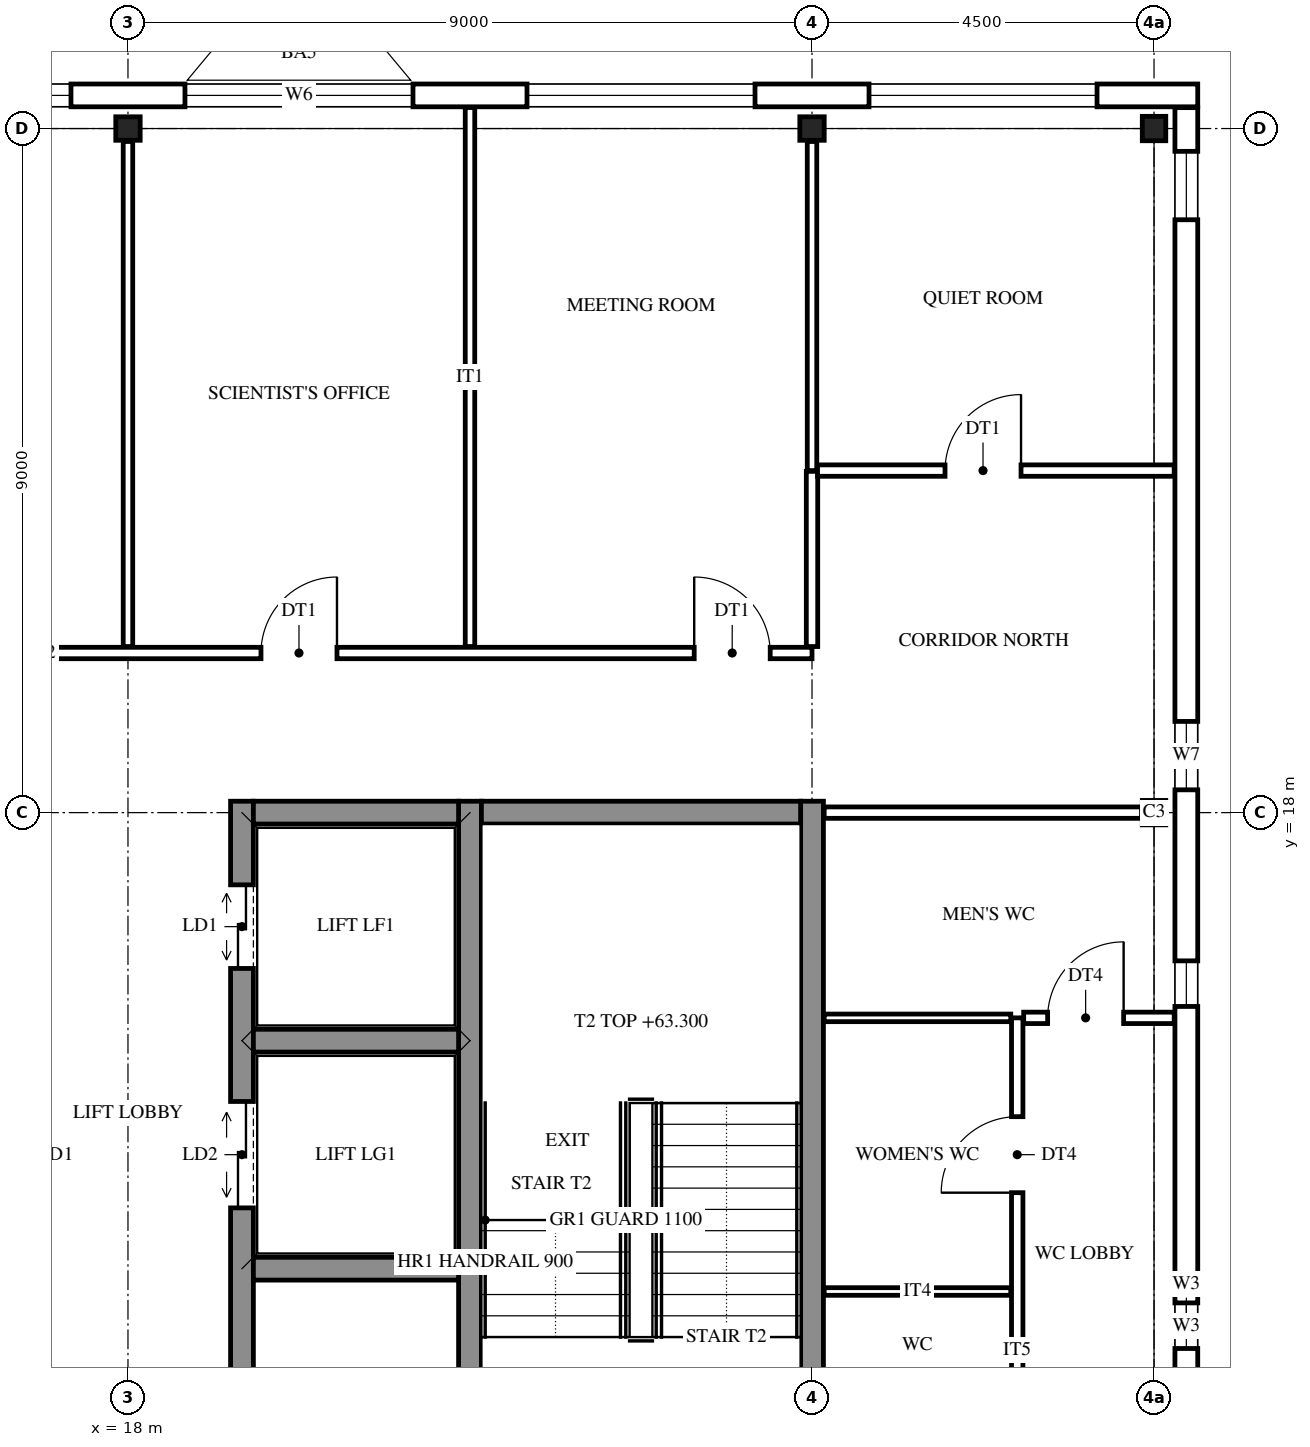
"""IFC4 building model, lengths in metres.
Left out: names, types, materials, properties, quantities, classifications, styles, units other than length and angle.
Written with IfcOpenShell. Run it as: python <this file> out.ifc"""

import sys

from ifc_helpers import new_model, si_unit, direction, frame, frame_2d, origin, origin_2d, place, context, subcontext, project, spatial, rectangle, i_section, extrude, element, fill, save


model = new_model("IFC4")
c1 = context("Model", 3, precision=1e-05, world=origin(), true_north=direction((0.0, 1.0)))
c2 = subcontext(c1, "Body", "Model", "MODEL_VIEW")
j1 = project(units=[si_unit("LENGTHUNIT", "METRE"), si_unit("PLANEANGLEUNIT", "RADIAN")], contexts=[c1])
p1 = place(None, origin())
s1 = spatial("IfcSite", under=j1, at=p1, CompositionType="ELEMENT")
p2 = place(p1, origin())
s2 = spatial("IfcBuilding", under=s1, at=p2, CompositionType="ELEMENT")
p3 = place(p2, frame((0.0, 0.0, 61.2)))
s3 = spatial("IfcBuildingStorey", under=s2, at=p3, CompositionType="ELEMENT", Elevation=61.2)
for number, where, z_axis, x_axis in (
    (1, (18.0, 27.0, 0.0), (0.0, 0.0, 1.0), (0.0, 1.0, 0.0)),
    (2, (27.0, 27.0, 0.0), (0.0, 0.0, 1.0), (0.0, 1.0, 0.0)),
    (3, (31.5, 18.0, 0.0), (0.0, 0.0, 1.0), (1.0, 0.0, 0.0)),
    (4, (31.5, 27.0, 0.0), (0.0, 0.0, 1.0), (1.0, 0.0, 0.0)),
):
    element("IfcColumn", number, at=place(p3, frame(where, z_axis=z_axis, x_axis=x_axis)), inside=s3, PredefinedType="COLUMN", context=c2, shape_type="SweptSolid", body=[
        extrude(i_section(OverallWidth=0.309, OverallDepth=0.321, WebThickness=0.014, FlangeThickness=0.022, FilletRadius=0.017, at=origin_2d()), origin(), (0.0, 0.0, 1.0), 4.2),
    ])
p4 = place(p3, frame((19.5, 8.85, 0.0), z_axis=(0.0, 0.0, 1.0), x_axis=(0.0, 1.0, 0.0)))
e5 = element("IfcWall", 5, at=p4, inside=s3, PredefinedType="SHEAR", context=c2, shape_type="SweptSolid", body=[
    extrude(rectangle(XDim=9.3, YDim=0.3, at=frame_2d((4.65, 0.0))), origin(), (0.0, 0.0, 1.0), 4.2),
])
p5 = place(p4, frame((3.95, 0.0, 0.0)))
e6 = element("IfcOpeningElement", 6, at=p5, cuts=e5, PredefinedType="OPENING", context=c2, shape_type="SweptSolid", body=[
    extrude(rectangle(XDim=1.4, YDim=2.1, at=frame_2d((0.7, 1.05))), frame((0.0, 0.16, 0.0), z_axis=(0.0, -1.0, 0.0), x_axis=(1.0, 0.0, 0.0)), (0.0, 0.0, 1.0), 0.32),
])
p6 = place(p4, frame((7.1, 0.0, 0.0)))
e7 = element("IfcOpeningElement", 7, at=p6, cuts=e5, PredefinedType="OPENING", context=c2, shape_type="SweptSolid", body=[
    extrude(rectangle(XDim=1.1, YDim=2.1, at=frame_2d((0.55, 1.05))), frame((0.0, 0.16, 0.0), z_axis=(0.0, -1.0, 0.0), x_axis=(1.0, 0.0, 0.0)), (0.0, 0.0, 1.0), 0.32),
])
for number, where, z_axis, x_axis in (
    (8, (22.5, 8.85, 0.0), (0.0, 0.0, 1.0), (0.0, 1.0, 0.0)),
    (9, (27.0, 8.85, 0.0), (0.0, 0.0, 1.0), (0.0, 1.0, 0.0)),
):
    element("IfcWall", number, at=place(p3, frame(where, z_axis=z_axis, x_axis=x_axis)), inside=s3, PredefinedType="SHEAR", context=c2, shape_type="SweptSolid", body=[
        extrude(rectangle(XDim=9.3, YDim=0.3, at=frame_2d((4.65, 0.0))), origin(), (0.0, 0.0, 1.0), 4.2),
    ])
for number, where, z_axis, x_axis in (
    (10, (19.65, 12.0, 0.0), (0.0, 0.0, 1.0), (1.0, 0.0, 0.0)),
    (11, (19.65, 15.0, 0.0), (0.0, 0.0, 1.0), (1.0, 0.0, 0.0)),
    (12, (19.65, 18.0, 0.0), (0.0, 0.0, 1.0), (1.0, 0.0, 0.0)),
):
    element("IfcWall", number, at=place(p3, frame(where, z_axis=z_axis, x_axis=x_axis)), inside=s3, PredefinedType="SHEAR", context=c2, shape_type="SweptSolid", body=[
        extrude(rectangle(XDim=2.7, YDim=0.3, at=frame_2d((1.35, 0.0))), origin(), (0.0, 0.0, 1.0), 4.2),
    ])
p7 = place(p3, frame((22.65, 18.0, 0.0), z_axis=(0.0, 0.0, 1.0), x_axis=(1.0, 0.0, 0.0)))
e13 = element("IfcWall", 13, at=p7, inside=s3, PredefinedType="SHEAR", context=c2, shape_type="SweptSolid", body=[
    extrude(rectangle(XDim=4.2, YDim=0.3, at=frame_2d((2.1, 0.0))), origin(), (0.0, 0.0, 1.0), 4.2),
])
p8 = place(p3, frame((8.414, 27.436, 0.0), z_axis=(0.0, 0.0, 1.0), x_axis=(1.0, 0.0, 0.0)))
e14 = element("IfcWall", 14, at=p8, inside=s3, PredefinedType="STANDARD", context=c2, shape_type="SweptSolid", body=[
    extrude(rectangle(XDim=23.661, YDim=0.3, at=frame_2d((11.831, 0.0))), origin(), (0.0, 0.0, 1.0), 4.2),
])
p9 = place(p8, frame((1.336, 0.0, 0.6)))
e15 = element("IfcOpeningElement", 15, at=p9, cuts=e14, PredefinedType="OPENING", context=c2, shape_type="SweptSolid", body=[
    extrude(rectangle(XDim=3.0, YDim=2.8, at=frame_2d((1.5, 1.4))), frame((0.0, 0.16, 0.0), z_axis=(0.0, -1.0, 0.0), x_axis=(1.0, 0.0, 0.0)), (0.0, 0.0, 1.0), 0.32),
])
p10 = place(p8, frame((5.836, 0.0, 0.6)))
e16 = element("IfcOpeningElement", 16, at=p10, cuts=e14, PredefinedType="OPENING", context=c2, shape_type="SweptSolid", body=[
    extrude(rectangle(XDim=3.0, YDim=2.8, at=frame_2d((1.5, 1.4))), frame((0.0, 0.16, 0.0), z_axis=(0.0, -1.0, 0.0), x_axis=(1.0, 0.0, 0.0)), (0.0, 0.0, 1.0), 0.32),
])
p11 = place(p8, frame((10.336, 0.0, 0.6)))
e17 = element("IfcOpeningElement", 17, at=p11, cuts=e14, PredefinedType="OPENING", context=c2, shape_type="SweptSolid", body=[
    extrude(rectangle(XDim=3.0, YDim=2.8, at=frame_2d((1.5, 1.4))), frame((0.0, 0.16, 0.0), z_axis=(0.0, -1.0, 0.0), x_axis=(1.0, 0.0, 0.0)), (0.0, 0.0, 1.0), 0.32),
])
p12 = place(p8, frame((14.836, 0.0, 0.6)))
e18 = element("IfcOpeningElement", 18, at=p12, cuts=e14, PredefinedType="OPENING", context=c2, shape_type="SweptSolid", body=[
    extrude(rectangle(XDim=3.0, YDim=2.8, at=frame_2d((1.5, 1.4))), frame((0.0, 0.16, 0.0), z_axis=(0.0, -1.0, 0.0), x_axis=(1.0, 0.0, 0.0)), (0.0, 0.0, 1.0), 0.32),
])
p13 = place(p8, frame((19.336, 0.0, 0.6)))
e19 = element("IfcOpeningElement", 19, at=p13, cuts=e14, PredefinedType="OPENING", context=c2, shape_type="SweptSolid", body=[
    extrude(rectangle(XDim=3.0, YDim=2.8, at=frame_2d((1.5, 1.4))), frame((0.0, 0.16, 0.0), z_axis=(0.0, -1.0, 0.0), x_axis=(1.0, 0.0, 0.0)), (0.0, 0.0, 1.0), 0.32),
])
p14 = place(p3, frame((31.925, 27.275, 0.0), z_axis=(0.0, 0.0, 1.0), x_axis=(0.0, -1.0, 0.0)))
e20 = element("IfcWall", 20, at=p14, inside=s3, PredefinedType="STANDARD", context=c2, shape_type="SweptSolid", body=[
    extrude(rectangle(XDim=27.55, YDim=0.3, at=frame_2d((13.775, 0.0))), origin(), (0.0, 0.0, 1.0), 4.2),
])
p15 = place(p14, frame((26.075, 0.0, 0.6)))
e21 = element("IfcOpeningElement", 21, at=p15, cuts=e20, PredefinedType="OPENING", context=c2, shape_type="SweptSolid", body=[
    extrude(rectangle(XDim=0.9, YDim=2.3, at=frame_2d((0.45, 1.15))), frame((0.0, 0.16, 0.0), z_axis=(0.0, -1.0, 0.0), x_axis=(1.0, 0.0, 0.0)), (0.0, 0.0, 1.0), 0.32),
])
p16 = place(p14, frame((18.575, 0.0, 0.6)))
e22 = element("IfcOpeningElement", 22, at=p16, cuts=e20, PredefinedType="OPENING", context=c2, shape_type="SweptSolid", body=[
    extrude(rectangle(XDim=0.9, YDim=2.3, at=frame_2d((0.45, 1.15))), frame((0.0, 0.16, 0.0), z_axis=(0.0, -1.0, 0.0), x_axis=(1.0, 0.0, 0.0)), (0.0, 0.0, 1.0), 0.32),
])
p17 = place(p14, frame((15.725, 0.0, 1.6)))
e23 = element("IfcOpeningElement", 23, at=p17, cuts=e20, PredefinedType="OPENING", context=c2, shape_type="SweptSolid", body=[
    extrude(rectangle(XDim=0.6, YDim=0.9, at=frame_2d((0.3, 0.45))), frame((0.0, 0.16, 0.0), z_axis=(0.0, -1.0, 0.0), x_axis=(1.0, 0.0, 0.0)), (0.0, 0.0, 1.0), 0.32),
])
p18 = place(p14, frame((11.225, 0.0, 1.6)))
e24 = element("IfcOpeningElement", 24, at=p18, cuts=e20, PredefinedType="OPENING", context=c2, shape_type="SweptSolid", body=[
    extrude(rectangle(XDim=0.6, YDim=0.9, at=frame_2d((0.3, 0.45))), frame((0.0, 0.16, 0.0), z_axis=(0.0, -1.0, 0.0), x_axis=(1.0, 0.0, 0.0)), (0.0, 0.0, 1.0), 0.32),
])
p19 = place(p14, frame((8.075, 0.0, 0.6)))
e25 = element("IfcOpeningElement", 25, at=p19, cuts=e20, PredefinedType="OPENING", context=c2, shape_type="SweptSolid", body=[
    extrude(rectangle(XDim=0.9, YDim=2.3, at=frame_2d((0.45, 1.15))), frame((0.0, 0.16, 0.0), z_axis=(0.0, -1.0, 0.0), x_axis=(1.0, 0.0, 0.0)), (0.0, 0.0, 1.0), 0.32),
])
p20 = place(p14, frame((0.575, 0.0, 0.6)))
e26 = element("IfcOpeningElement", 26, at=p20, cuts=e20, PredefinedType="OPENING", context=c2, shape_type="SweptSolid", body=[
    extrude(rectangle(XDim=0.9, YDim=2.3, at=frame_2d((0.45, 1.15))), frame((0.0, 0.16, 0.0), z_axis=(0.0, -1.0, 0.0), x_axis=(1.0, 0.0, 0.0)), (0.0, 0.0, 1.0), 0.32),
])
p21 = place(p3, frame((18.0, 20.185, 0.0), z_axis=(0.0, 0.0, 1.0), x_axis=(0.0, 1.0, 0.0)))
e27 = element("IfcWall", 27, at=p21, inside=s3, PredefinedType="PARTITIONING", context=c2, shape_type="SweptSolid", body=[
    extrude(rectangle(XDim=6.645, YDim=0.125, at=frame_2d((3.322, 0.0))), origin(), (0.0, 0.0, 1.0), 3.537),
])
p22 = place(p3, frame((22.5, 20.185, 0.0), z_axis=(0.0, 0.0, 1.0), x_axis=(0.0, 1.0, 0.0)))
e28 = element("IfcWall", 28, at=p22, inside=s3, PredefinedType="PARTITIONING", context=c2, shape_type="SweptSolid", body=[
    extrude(rectangle(XDim=7.091, YDim=0.125, at=frame_2d((3.545, 0.0))), origin(), (0.0, 0.0, 1.0), 3.537),
])
p23 = place(p3, frame((27.0, 20.185, 0.0), z_axis=(0.0, 0.0, 1.0), x_axis=(0.0, 1.0, 0.0)))
e29 = element("IfcWall", 29, at=p23, inside=s3, PredefinedType="PARTITIONING", context=c2, shape_type="SweptSolid", body=[
    extrude(rectangle(XDim=2.305, YDim=0.15, at=frame_2d((1.152, 0.0))), origin(), (0.0, 0.0, 1.0), 3.537),
])
p24 = place(p3, frame((27.0, 22.5, 0.0), z_axis=(0.0, 0.0, 1.0), x_axis=(0.0, 1.0, 0.0)))
e30 = element("IfcWall", 30, at=p24, inside=s3, PredefinedType="PARTITIONING", context=c2, shape_type="SweptSolid", body=[
    extrude(rectangle(XDim=4.33, YDim=0.125, at=frame_2d((2.165, 0.0))), origin(), (0.0, 0.0, 1.0), 3.537),
])
p25 = place(p3, frame((29.7, 9.0, 0.0), z_axis=(0.0, 0.0, 1.0), x_axis=(0.0, 1.0, 0.0)))
e31 = element("IfcWall", 31, at=p25, inside=s3, PredefinedType="PARTITIONING", context=c2, shape_type="SweptSolid", body=[
    extrude(rectangle(XDim=6.3, YDim=0.15, at=frame_2d((3.15, 0.0))), origin(), (0.0, 0.0, 1.0), 3.537),
])
p26 = place(p25, frame((4.0, 0.0, 0.0)))
e32 = element("IfcOpeningElement", 32, at=p26, cuts=e31, PredefinedType="OPENING", context=c2, shape_type="SweptSolid", body=[
    extrude(rectangle(XDim=1.0, YDim=2.1, at=frame_2d((0.5, 1.05))), frame((0.0, 0.085, 0.0), z_axis=(0.0, -1.0, 0.0), x_axis=(1.0, 0.0, 0.0)), (0.0, 0.0, 1.0), 0.17),
])
for number, where, z_axis, x_axis in (
    (33, (27.16, 11.7, 0.0), (0.0, 0.0, 1.0), (1.0, 0.0, 0.0)),
    (34, (27.16, 15.3, 0.0), (0.0, 0.0, 1.0), (1.0, 0.0, 0.0)),
):
    element("IfcWall", number, at=place(p3, frame(where, z_axis=z_axis, x_axis=x_axis)), inside=s3, PredefinedType="PARTITIONING", context=c2, shape_type="SweptSolid", body=[
        extrude(rectangle(XDim=2.455, YDim=0.1, at=frame_2d((1.228, 0.0))), origin(), (0.0, 0.0, 1.0), 3.537),
    ])
p27 = place(p3, frame((29.785, 15.3, 0.0), z_axis=(0.0, 0.0, 1.0), x_axis=(1.0, 0.0, 0.0)))
e35 = element("IfcWall", 35, at=p27, inside=s3, PredefinedType="PARTITIONING", context=c2, shape_type="SweptSolid", body=[
    extrude(rectangle(XDim=1.98, YDim=0.15, at=frame_2d((0.99, 0.0))), origin(), (0.0, 0.0, 1.0), 3.537),
])
p28 = place(p27, frame((0.315, 0.0, 0.0)))
e36 = element("IfcOpeningElement", 36, at=p28, cuts=e35, PredefinedType="OPENING", context=c2, shape_type="SweptSolid", body=[
    extrude(rectangle(XDim=1.0, YDim=2.1, at=frame_2d((0.5, 1.05))), frame((0.0, 0.085, 0.0), z_axis=(0.0, -1.0, 0.0), x_axis=(1.0, 0.0, 0.0)), (0.0, 0.0, 1.0), 0.17),
])
p29 = place(p3, frame((27.16, 18.0, 0.0), z_axis=(0.0, 0.0, 1.0), x_axis=(1.0, 0.0, 0.0)))
e37 = element("IfcWall", 37, at=p29, inside=s3, PredefinedType="PARTITIONING", context=c2, shape_type="SweptSolid", body=[
    extrude(rectangle(XDim=4.176, YDim=0.15, at=frame_2d((2.088, 0.0))), origin(), (0.0, 0.0, 1.0), 3.537),
])
p30 = place(p3, frame((8.724, 20.1, 0.0), z_axis=(0.0, 0.0, 1.0), x_axis=(1.0, 0.0, 0.0)))
e38 = element("IfcWall", 38, at=p30, inside=s3, PredefinedType="PARTITIONING", context=c2, shape_type="SweptSolid", body=[
    extrude(rectangle(XDim=18.276, YDim=0.15, at=frame_2d((9.138, 0.0))), origin(), (0.0, 0.0, 1.0), 3.537),
])
p31 = place(p30, frame((4.276, 0.0, 0.0)))
e39 = element("IfcOpeningElement", 39, at=p31, cuts=e38, PredefinedType="OPENING", context=c2, shape_type="SweptSolid", body=[
    extrude(rectangle(XDim=1.0, YDim=2.1, at=frame_2d((0.5, 1.05))), frame((0.0, 0.085, 0.0), z_axis=(0.0, -1.0, 0.0), x_axis=(1.0, 0.0, 0.0)), (0.0, 0.0, 1.0), 0.17),
])
p32 = place(p30, frame((11.026, 0.0, 0.0)))
e40 = element("IfcOpeningElement", 40, at=p32, cuts=e38, PredefinedType="OPENING", context=c2, shape_type="SweptSolid", body=[
    extrude(rectangle(XDim=1.0, YDim=2.1, at=frame_2d((0.5, 1.05))), frame((0.0, 0.085, 0.0), z_axis=(0.0, -1.0, 0.0), x_axis=(1.0, 0.0, 0.0)), (0.0, 0.0, 1.0), 0.17),
])
p33 = place(p30, frame((16.726, 0.0, 0.0)))
e41 = element("IfcOpeningElement", 41, at=p33, cuts=e38, PredefinedType="OPENING", context=c2, shape_type="SweptSolid", body=[
    extrude(rectangle(XDim=1.0, YDim=2.1, at=frame_2d((0.5, 1.05))), frame((0.0, 0.085, 0.0), z_axis=(0.0, -1.0, 0.0), x_axis=(1.0, 0.0, 0.0)), (0.0, 0.0, 1.0), 0.17),
])
p34 = place(p3, frame((27.073, 22.5, 0.0), z_axis=(0.0, 0.0, 1.0), x_axis=(1.0, 0.0, 0.0)))
e42 = element("IfcWall", 42, at=p34, inside=s3, PredefinedType="PARTITIONING", context=c2, shape_type="SweptSolid", body=[
    extrude(rectangle(XDim=4.692, YDim=0.15, at=frame_2d((2.346, 0.0))), origin(), (0.0, 0.0, 1.0), 3.537),
])
p35 = place(p34, frame((1.677, 0.0, 0.0)))
e43 = element("IfcOpeningElement", 43, at=p35, cuts=e42, PredefinedType="OPENING", context=c2, shape_type="SweptSolid", body=[
    extrude(rectangle(XDim=1.0, YDim=2.1, at=frame_2d((0.5, 1.05))), frame((0.0, 0.085, 0.0), z_axis=(0.0, -1.0, 0.0), x_axis=(1.0, 0.0, 0.0)), (0.0, 0.0, 1.0), 0.17),
])
p36 = place(p10, origin())
e44 = element("IfcWindow", 44, at=p36, inside=s3, PartitioningType="SINGLE_PANEL", PredefinedType="WINDOW", context=c2, shape_type="SweptSolid", body=[
    extrude(rectangle(XDim=3.0, YDim=2.8, at=frame_2d((1.5, 1.4))), frame((0.0, 0.03, 0.0), z_axis=(0.0, -1.0, 0.0), x_axis=(1.0, 0.0, 0.0)), (0.0, 0.0, 1.0), 0.06),
])
fill(e16, e44)
p37 = place(p11, origin())
e45 = element("IfcWindow", 45, at=p37, inside=s3, PartitioningType="SINGLE_PANEL", PredefinedType="WINDOW", context=c2, shape_type="SweptSolid", body=[
    extrude(rectangle(XDim=3.0, YDim=2.8, at=frame_2d((1.5, 1.4))), frame((0.0, 0.03, 0.0), z_axis=(0.0, -1.0, 0.0), x_axis=(1.0, 0.0, 0.0)), (0.0, 0.0, 1.0), 0.06),
])
fill(e17, e45)
p38 = place(p12, origin())
e46 = element("IfcWindow", 46, at=p38, inside=s3, PartitioningType="SINGLE_PANEL", PredefinedType="WINDOW", context=c2, shape_type="SweptSolid", body=[
    extrude(rectangle(XDim=3.0, YDim=2.8, at=frame_2d((1.5, 1.4))), frame((0.0, 0.03, 0.0), z_axis=(0.0, -1.0, 0.0), x_axis=(1.0, 0.0, 0.0)), (0.0, 0.0, 1.0), 0.06),
])
fill(e18, e46)
p39 = place(p13, origin())
e47 = element("IfcWindow", 47, at=p39, inside=s3, PartitioningType="SINGLE_PANEL", PredefinedType="WINDOW", context=c2, shape_type="SweptSolid", body=[
    extrude(rectangle(XDim=3.0, YDim=2.8, at=frame_2d((1.5, 1.4))), frame((0.0, 0.03, 0.0), z_axis=(0.0, -1.0, 0.0), x_axis=(1.0, 0.0, 0.0)), (0.0, 0.0, 1.0), 0.06),
])
fill(e19, e47)
p40 = place(p17, origin())
e48 = element("IfcWindow", 48, at=p40, inside=s3, PartitioningType="SINGLE_PANEL", PredefinedType="WINDOW", context=c2, shape_type="SweptSolid", body=[
    extrude(rectangle(XDim=0.6, YDim=0.9, at=frame_2d((0.3, 0.45))), frame((0.0, 0.03, 0.0), z_axis=(0.0, -1.0, 0.0), x_axis=(1.0, 0.0, 0.0)), (0.0, 0.0, 1.0), 0.06),
])
fill(e23, e48)
p41 = place(p18, origin())
e49 = element("IfcWindow", 49, at=p41, inside=s3, PartitioningType="SINGLE_PANEL", PredefinedType="WINDOW", context=c2, shape_type="SweptSolid", body=[
    extrude(rectangle(XDim=0.6, YDim=0.9, at=frame_2d((0.3, 0.45))), frame((0.0, 0.03, 0.0), z_axis=(0.0, -1.0, 0.0), x_axis=(1.0, 0.0, 0.0)), (0.0, 0.0, 1.0), 0.06),
])
fill(e24, e49)
p42 = place(p19, origin())
e50 = element("IfcWindow", 50, at=p42, inside=s3, PartitioningType="SINGLE_PANEL", PredefinedType="WINDOW", context=c2, shape_type="SweptSolid", body=[
    extrude(rectangle(XDim=0.9, YDim=2.3, at=frame_2d((0.45, 1.15))), frame((0.0, 0.03, 0.0), z_axis=(0.0, -1.0, 0.0), x_axis=(1.0, 0.0, 0.0)), (0.0, 0.0, 1.0), 0.06),
])
fill(e25, e50)
p43 = place(p20, origin())
e51 = element("IfcWindow", 51, at=p43, inside=s3, PartitioningType="SINGLE_PANEL", PredefinedType="WINDOW", context=c2, shape_type="SweptSolid", body=[
    extrude(rectangle(XDim=0.9, YDim=2.3, at=frame_2d((0.45, 1.15))), frame((0.0, 0.03, 0.0), z_axis=(0.0, -1.0, 0.0), x_axis=(1.0, 0.0, 0.0)), (0.0, 0.0, 1.0), 0.06),
])
fill(e26, e51)
p44 = place(p26, origin())
e52 = element("IfcDoor", 52, at=p44, inside=s3, OperationType="SINGLE_SWING_LEFT", PredefinedType="DOOR", context=c2, shape_type="SweptSolid", body=[
    extrude(rectangle(XDim=1.0, YDim=2.1, at=frame_2d((0.5, 1.05))), frame((0.0, 0.025, 0.0), z_axis=(0.0, -1.0, 0.0), x_axis=(1.0, 0.0, 0.0)), (0.0, 0.0, 1.0), 0.05),
])
fill(e32, e52)
p45 = place(p28, origin())
e53 = element("IfcDoor", 53, at=p45, inside=s3, OperationType="SINGLE_SWING_RIGHT", PredefinedType="DOOR", context=c2, shape_type="SweptSolid", body=[
    extrude(rectangle(XDim=1.0, YDim=2.1, at=frame_2d((0.5, 1.05))), frame((0.0, 0.025, 0.0), z_axis=(0.0, -1.0, 0.0), x_axis=(1.0, 0.0, 0.0)), (0.0, 0.0, 1.0), 0.05),
])
fill(e36, e53)
p46 = place(p32, origin())
e54 = element("IfcDoor", 54, at=p46, inside=s3, OperationType="SINGLE_SWING_RIGHT", PredefinedType="DOOR", context=c2, shape_type="SweptSolid", body=[
    extrude(rectangle(XDim=1.0, YDim=2.1, at=frame_2d((0.5, 1.05))), frame((0.0, 0.025, 0.0), z_axis=(0.0, -1.0, 0.0), x_axis=(1.0, 0.0, 0.0)), (0.0, 0.0, 1.0), 0.05),
])
fill(e40, e54)
p47 = place(p33, origin())
e55 = element("IfcDoor", 55, at=p47, inside=s3, OperationType="SINGLE_SWING_LEFT", PredefinedType="DOOR", context=c2, shape_type="SweptSolid", body=[
    extrude(rectangle(XDim=1.0, YDim=2.1, at=frame_2d((0.5, 1.05))), frame((0.0, 0.025, 0.0), z_axis=(0.0, -1.0, 0.0), x_axis=(1.0, 0.0, 0.0)), (0.0, 0.0, 1.0), 0.05),
])
fill(e41, e55)
p48 = place(p35, origin())
e56 = element("IfcDoor", 56, at=p48, inside=s3, OperationType="SINGLE_SWING_RIGHT", PredefinedType="DOOR", context=c2, shape_type="SweptSolid", body=[
    extrude(rectangle(XDim=1.0, YDim=2.1, at=frame_2d((0.5, 1.05))), frame((0.0, 0.025, 0.0), z_axis=(0.0, -1.0, 0.0), x_axis=(1.0, 0.0, 0.0)), (0.0, 0.0, 1.0), 0.05),
])
fill(e43, e56)
p49 = place(p5, origin())
e57 = element("IfcDoor", 57, at=p49, inside=s3, OperationType="DOUBLE_DOOR_SLIDING", PredefinedType="DOOR", context=c2, shape_type="SweptSolid", body=[
    extrude(rectangle(XDim=1.4, YDim=2.1, at=frame_2d((0.7, 1.05))), frame((0.0, 0.025, 0.0), z_axis=(0.0, -1.0, 0.0), x_axis=(1.0, 0.0, 0.0)), (0.0, 0.0, 1.0), 0.05),
])
fill(e6, e57)
p50 = place(p6, origin())
e58 = element("IfcDoor", 58, at=p50, inside=s3, OperationType="DOUBLE_DOOR_SLIDING", PredefinedType="DOOR", context=c2, shape_type="SweptSolid", body=[
    extrude(rectangle(XDim=1.1, YDim=2.1, at=frame_2d((0.55, 1.05))), frame((0.0, 0.025, 0.0), z_axis=(0.0, -1.0, 0.0), x_axis=(1.0, 0.0, 0.0)), (0.0, 0.0, 1.0), 0.05),
])
fill(e7, e58)
save(model, sys.argv[1])
